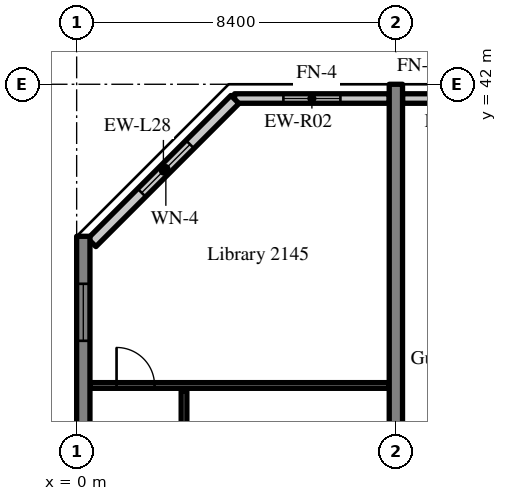
"""IFC4 building model, lengths in metres.
Left out: names, types, materials, properties, quantities, classifications, styles, units other than length and angle.
Written with IfcOpenShell. Run it as: python <this file> out.ifc"""

import sys

from ifc_helpers import new_model, si_unit, direction, frame, frame_2d, origin, place, context, subcontext, project, spatial, rectangle, extrude, source, transform, mapped, element, fill, save


model = new_model("IFC4")
c1 = context("Model", 3, precision=1e-05, world=origin(), true_north=direction((0.0, 1.0)))
c2 = subcontext(c1, "Body", "Model", "MODEL_VIEW")
j1 = project(units=[si_unit("LENGTHUNIT", "METRE"), si_unit("PLANEANGLEUNIT", "RADIAN")], contexts=[c1])
p1 = place(None, origin())
s1 = spatial("IfcSite", under=j1, at=p1, CompositionType="ELEMENT")
p2 = place(p1, origin())
s2 = spatial("IfcBuilding", under=s1, at=p2, CompositionType="ELEMENT")
p3 = place(p2, frame((0.0, 0.0, 91.4)))
s3 = spatial("IfcBuildingStorey", under=s2, at=p3, CompositionType="ELEMENT", Elevation=91.4)
m1 = source(origin(), c2, "Body", "SweptSolid", [
    extrude(rectangle(XDim=16.0, YDim=0.35, at=frame_2d((8.0, 0.0))), origin(), (0.0, 0.0, 1.0), 3.52),
])
p4 = place(p3, frame((0.175, 22.0, 0.0), z_axis=(0.0, 0.0, 1.0), x_axis=(0.0, 1.0, 0.0)))
e1 = element("IfcWall", 1, at=p4, inside=s3, PredefinedType="SHEAR", context=c2, shape_type="MappedRepresentation", body=[
    mapped(m1, transform((0.0, 0.0, 0.0), scale=1.0)),
])
m2 = source(origin(), c2, "Body", "SweptSolid", [
    extrude(rectangle(XDim=1.5, YDim=1.5, at=frame_2d((0.75, 0.75))), frame((0.0, 0.185, 0.0), z_axis=(0.0, -1.0, 0.0), x_axis=(1.0, 0.0, 0.0)), (0.0, 0.0, 1.0), 0.37),
])
p5 = place(p4, frame((1.25, 0.0, 0.9)))
e2 = element("IfcOpeningElement", 2, at=p5, cuts=e1, PredefinedType="OPENING", context=c2, shape_type="MappedRepresentation", body=[
    mapped(m2, transform((0.0, 0.0, 0.0), scale=1.0)),
])
p6 = place(p4, frame((5.25, 0.0, 0.9)))
e3 = element("IfcOpeningElement", 3, at=p6, cuts=e1, PredefinedType="OPENING", context=c2, shape_type="MappedRepresentation", body=[
    mapped(m2, transform((0.0, 0.0, 0.0), scale=1.0)),
])
p7 = place(p4, frame((9.25, 0.0, 0.9)))
e4 = element("IfcOpeningElement", 4, at=p7, cuts=e1, PredefinedType="OPENING", context=c2, shape_type="MappedRepresentation", body=[
    mapped(m2, transform((0.0, 0.0, 0.0), scale=1.0)),
])
p8 = place(p4, frame((13.25, 0.0, 0.9)))
e5 = element("IfcOpeningElement", 5, at=p8, cuts=e1, PredefinedType="OPENING", context=c2, shape_type="MappedRepresentation", body=[
    mapped(m2, transform((0.0, 0.0, 0.0), scale=1.0)),
])
m3 = source(origin(), c2, "Body", "SweptSolid", [
    extrude(rectangle(XDim=20.0, YDim=0.35, at=frame_2d((10.0, 0.0))), origin(), (0.0, 0.0, 1.0), 3.52),
])
p9 = place(p3, frame((8.4, 22.0, 0.0), z_axis=(0.0, 0.0, 1.0), x_axis=(0.0, 1.0, 0.0)))
e6 = element("IfcWall", 6, at=p9, inside=s3, PredefinedType="SHEAR", context=c2, shape_type="MappedRepresentation", body=[
    mapped(m3, transform((0.0, 0.0, 0.0), scale=1.0)),
])
m4 = source(origin(), c2, "Body", "SweptSolid", [
    extrude(rectangle(XDim=4.07, YDim=0.25, at=frame_2d((2.035, 0.0))), origin(), (0.0, 0.0, 1.0), 2.82),
])
p10 = place(p3, frame((8.225, 41.625, 0.0), z_axis=(0.0, 0.0, 1.0), x_axis=(-1.0, 0.0, 0.0)))
e7 = element("IfcWall", 7, at=p10, inside=s3, PredefinedType="SOLIDWALL", context=c2, shape_type="MappedRepresentation", body=[
    mapped(m4, transform((0.0, 0.0, 0.0), scale=1.0)),
])
m5 = source(origin(), c2, "Body", "SweptSolid", [
    extrude(rectangle(XDim=1.5, YDim=1.5, at=frame_2d((0.75, 0.75))), frame((0.0, 0.135, 0.0), z_axis=(0.0, -1.0, 0.0), x_axis=(1.0, 0.0, 0.0)), (0.0, 0.0, 1.0), 0.27),
])
p11 = place(p10, frame((1.285, 0.0, 0.9)))
e8 = element("IfcOpeningElement", 8, at=p11, cuts=e7, PredefinedType="OPENING", context=c2, shape_type="MappedRepresentation", body=[
    mapped(m5, transform((0.0, 0.0, 0.0), scale=1.0)),
])
m6 = source(origin(), c2, "Body", "SweptSolid", [
    extrude(rectangle(XDim=3.675, YDim=0.25, at=frame_2d((1.837, 0.0))), origin(), (0.0, 0.0, 1.0), 2.82),
])
p12 = place(p3, frame((12.25, 41.625, 0.0), z_axis=(0.0, 0.0, 1.0), x_axis=(-1.0, 0.0, 0.0)))
e9 = element("IfcWall", 9, at=p12, inside=s3, PredefinedType="SOLIDWALL", context=c2, shape_type="MappedRepresentation", body=[
    mapped(m6, transform((0.0, 0.0, 0.0), scale=1.0)),
])
p13 = place(p12, frame((1.087, 0.0, 0.9)))
e10 = element("IfcOpeningElement", 10, at=p13, cuts=e9, PredefinedType="OPENING", context=c2, shape_type="MappedRepresentation", body=[
    mapped(m5, transform((0.0, 0.0, 0.0), scale=1.0)),
])
m7 = source(origin(), c2, "Body", "SweptSolid", [
    extrude(rectangle(XDim=5.326, YDim=0.3, at=frame_2d((2.663, 0.0))), origin(), (0.0, 0.0, 1.0), 3.52),
])
p14 = place(p3, frame((4.166, 41.6, 0.0), z_axis=(0.0, 0.0, 1.0), x_axis=(-0.707106781187, -0.707106781187, 0.0)))
e11 = element("IfcWall", 11, at=p14, inside=s3, PredefinedType="SOLIDWALL", context=c2, shape_type="MappedRepresentation", body=[
    mapped(m7, transform((0.0, 0.0, 0.0), scale=1.0)),
])
m8 = source(origin(), c2, "Body", "SweptSolid", [
    extrude(rectangle(XDim=1.8, YDim=1.5, at=frame_2d((0.9, 0.75))), frame((0.0, 0.16, 0.0), z_axis=(0.0, -1.0, 0.0), x_axis=(1.0, 0.0, 0.0)), (0.0, 0.0, 1.0), 0.32),
])
p15 = place(p14, frame((1.672, 0.0, 0.9)))
e12 = element("IfcOpeningElement", 12, at=p15, cuts=e11, PredefinedType="OPENING", context=c2, shape_type="MappedRepresentation", body=[
    mapped(m8, transform((0.0, 0.0, 0.0), scale=1.0)),
])
m9 = source(origin(), c2, "Body", "SweptSolid", [
    extrude(rectangle(XDim=4.45, YDim=0.15, at=frame_2d((2.225, 0.0))), origin(), (0.0, 0.0, 1.0), 3.52),
])
p16 = place(p3, frame((2.825, 29.475, 0.0), z_axis=(0.0, 0.0, 1.0), x_axis=(0.0, 1.0, 0.0)))
e13 = element("IfcWall", 13, at=p16, inside=s3, PredefinedType="PARTITIONING", context=c2, shape_type="MappedRepresentation", body=[
    mapped(m9, transform((0.0, 0.0, 0.0), scale=1.0)),
])
m10 = source(origin(), c2, "Body", "SweptSolid", [
    extrude(rectangle(XDim=1.0, YDim=2.1, at=frame_2d((0.5, 1.05))), frame((0.0, 0.085, 0.0), z_axis=(0.0, -1.0, 0.0), x_axis=(1.0, 0.0, 0.0)), (0.0, 0.0, 1.0), 0.17),
])
p17 = place(p16, frame((1.725, 0.0, 0.0)))
e14 = element("IfcOpeningElement", 14, at=p17, cuts=e13, PredefinedType="OPENING", context=c2, shape_type="MappedRepresentation", body=[
    mapped(m10, transform((0.0, 0.0, 0.0), scale=1.0)),
])
m11 = source(origin(), c2, "Body", "SweptSolid", [
    extrude(rectangle(XDim=7.875, YDim=0.15, at=frame_2d((3.938, 0.0))), origin(), (0.0, 0.0, 1.0), 3.52),
])
p18 = place(p3, frame((0.35, 34.075, 0.0), z_axis=(0.0, 0.0, 1.0), x_axis=(1.0, 0.0, 0.0)))
e15 = element("IfcWall", 15, at=p18, inside=s3, PredefinedType="PARTITIONING", context=c2, shape_type="MappedRepresentation", body=[
    mapped(m11, transform((0.0, 0.0, 0.0), scale=1.0)),
])
p19 = place(p18, frame((0.7, 0.0, 0.0)))
e16 = element("IfcOpeningElement", 16, at=p19, cuts=e15, PredefinedType="OPENING", context=c2, shape_type="MappedRepresentation", body=[
    mapped(m10, transform((0.0, 0.0, 0.0), scale=1.0)),
])
m12 = source(origin(), c2, "Body", "SweptSolid", [
    extrude(rectangle(XDim=1.5, YDim=1.5, at=frame_2d((0.75, 0.75))), frame((0.0, 0.03, 0.0), z_axis=(0.0, -1.0, 0.0), x_axis=(1.0, 0.0, 0.0)), (0.0, 0.0, 1.0), 0.06),
])
p20 = place(p11, origin())
e17 = element("IfcWindow", 17, at=p20, inside=s3, PartitioningType="SINGLE_PANEL", PredefinedType="WINDOW", context=c2, shape_type="MappedRepresentation", body=[
    mapped(m12, transform((0.0, 0.0, 0.0), scale=1.0)),
])
fill(e8, e17)
m13 = source(origin(), c2, "Body", "SweptSolid", [
    extrude(rectangle(XDim=1.8, YDim=1.5, at=frame_2d((0.9, 0.75))), frame((0.0, 0.03, 0.0), z_axis=(0.0, -1.0, 0.0), x_axis=(1.0, 0.0, 0.0)), (0.0, 0.0, 1.0), 0.06),
])
p21 = place(p15, origin())
e18 = element("IfcWindow", 18, at=p21, inside=s3, PartitioningType="SINGLE_PANEL", PredefinedType="WINDOW", context=c2, shape_type="MappedRepresentation", body=[
    mapped(m13, transform((0.0, 0.0, 0.0), scale=1.0)),
])
fill(e12, e18)
p22 = place(p8, origin())
e19 = element("IfcWindow", 19, at=p22, inside=s3, PartitioningType="SINGLE_PANEL", PredefinedType="WINDOW", context=c2, shape_type="MappedRepresentation", body=[
    mapped(m12, transform((0.0, 0.0, 0.0), scale=1.0)),
])
fill(e5, e19)
m14 = source(origin(), c2, "Body", "SweptSolid", [
    extrude(rectangle(XDim=1.0, YDim=2.1, at=frame_2d((0.5, 1.05))), frame((0.0, 0.025, 0.0), z_axis=(0.0, -1.0, 0.0), x_axis=(1.0, 0.0, 0.0)), (0.0, 0.0, 1.0), 0.05),
])
p23 = place(p19, origin())
e20 = element("IfcDoor", 20, at=p23, inside=s3, OperationType="SINGLE_SWING_LEFT", PredefinedType="DOOR", context=c2, shape_type="MappedRepresentation", body=[
    mapped(m14, transform((0.0, 0.0, 0.0), scale=1.0)),
])
fill(e16, e20)
save(model, sys.argv[1])
